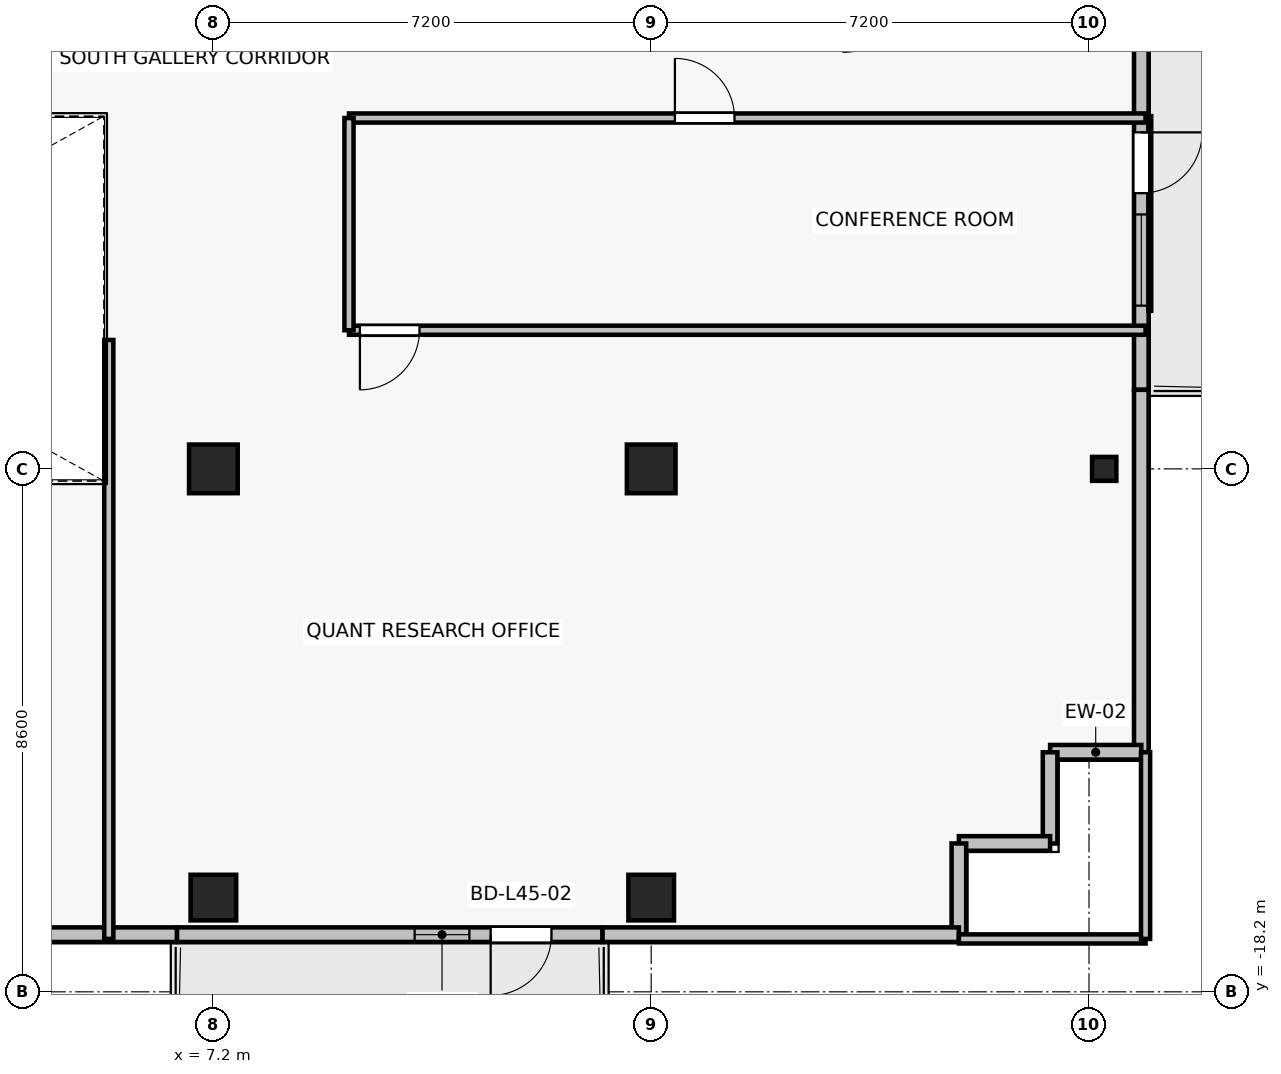
"""IFC4 building model, lengths in metres.
Left out: names, types, materials, properties, quantities, classifications, styles, units other than length and angle.
Written with IfcOpenShell. Run it as: python <this file> out.ifc"""

import sys

from ifc_helpers import new_model, si_unit, direction, frame, frame_2d, origin, origin_2d, place, context, subcontext, project, spatial, rectangle, i_section, extrude, source, transform, mapped, element, fill, save


model = new_model("IFC4")
c1 = context("Model", 3, precision=1e-05, world=origin(), true_north=direction((0.0, 1.0)))
c2 = subcontext(c1, "Body", "Model", "MODEL_VIEW")
j1 = project(units=[si_unit("LENGTHUNIT", "METRE"), si_unit("PLANEANGLEUNIT", "RADIAN")], contexts=[c1])
p1 = place(None, origin())
s1 = spatial("IfcSite", under=j1, at=p1, CompositionType="ELEMENT")
p2 = place(p1, origin())
s2 = spatial("IfcBuilding", under=s1, at=p2, CompositionType="ELEMENT")
p3 = place(p2, frame((0.0, 0.0, 162.7)))
s3 = spatial("IfcBuildingStorey", under=s2, at=p3, CompositionType="ELEMENT", Elevation=162.7)
for number, where, z_axis, x_axis in (
    (1, (7.2, -9.6, 0.0), (0.0, 0.0, 1.0), (1.0, 0.0, 0.0)),
    (2, (14.4, -9.6, 0.0), (0.0, 0.0, 1.0), (1.0, 0.0, 0.0)),
):
    element("IfcColumn", number, at=place(p3, frame(where, z_axis=z_axis, x_axis=x_axis)), inside=s3, PredefinedType="COLUMN", context=c2, shape_type="SweptSolid", body=[
        extrude(rectangle(XDim=0.8, YDim=0.8, at=origin_2d()), origin(), (0.0, 0.0, 1.0), 3.3),
    ])
for number, where, z_axis, x_axis in (
    (3, (7.2, -16.65, 0.0), (0.0, 0.0, 1.0), (1.0, 0.0, 0.0)),
    (4, (14.4, -16.65, 0.0), (0.0, 0.0, 1.0), (1.0, 0.0, 0.0)),
):
    element("IfcColumn", number, at=place(p3, frame(where, z_axis=z_axis, x_axis=x_axis)), inside=s3, PredefinedType="COLUMN", context=c2, shape_type="SweptSolid", body=[
        extrude(rectangle(XDim=0.75, YDim=0.75, at=origin_2d()), origin(), (0.0, 0.0, 1.0), 3.3),
    ])
p4 = place(p3, frame((21.85, -9.6, 0.0), z_axis=(0.0, 0.0, 1.0), x_axis=(1.0, 0.0, 0.0)))
e5 = element("IfcColumn", 5, at=p4, inside=s3, PredefinedType="COLUMN", context=c2, shape_type="SweptSolid", body=[
    extrude(i_section(OverallWidth=0.399, OverallDepth=0.394, WebThickness=0.023, FlangeThickness=0.037, FilletRadius=0.015, at=origin_2d()), origin(), (0.0, 0.0, 1.0), 3.3),
])
p5 = place(p3, frame((13.6, -17.26, 0.0), z_axis=(0.0, 0.0, 1.0), x_axis=(-1.0, 0.0, 0.0)))
e6 = element("IfcWall", 6, at=p5, inside=s3, PredefinedType="SOLIDWALL", context=c2, shape_type="SweptSolid", body=[
    extrude(rectangle(XDim=7.0, YDim=0.24, at=frame_2d((3.5, 0.0))), origin(), (0.0, 0.0, 1.0), 2.665),
])
p6 = place(p5, frame((0.84, 0.0, 0.0)))
e7 = element("IfcOpeningElement", 7, at=p6, cuts=e6, PredefinedType="OPENING", context=c2, shape_type="SweptSolid", body=[
    extrude(rectangle(XDim=1.0, YDim=2.2, at=frame_2d((0.5, 1.1))), frame((0.0, 0.13, 0.0), z_axis=(0.0, -1.0, 0.0), x_axis=(1.0, 0.0, 0.0)), (0.0, 0.0, 1.0), 0.26),
])
p7 = place(p5, frame((2.19, 0.0, 0.85)))
e8 = element("IfcOpeningElement", 8, at=p7, cuts=e6, PredefinedType="OPENING", context=c2, shape_type="SweptSolid", body=[
    extrude(rectangle(XDim=0.9, YDim=1.35, at=frame_2d((0.45, 0.675))), frame((0.0, 0.13, 0.0), z_axis=(0.0, -1.0, 0.0), x_axis=(1.0, 0.0, 0.0)), (0.0, 0.0, 1.0), 0.26),
])
p8 = place(p3, frame((22.46, -2.5, 0.0), z_axis=(0.0, 0.0, 1.0), x_axis=(0.0, -1.0, 0.0)))
e9 = element("IfcWall", 9, at=p8, inside=s3, PredefinedType="SOLIDWALL", context=c2, shape_type="SweptSolid", body=[
    extrude(rectangle(XDim=5.8, YDim=0.24, at=frame_2d((2.9, 0.0))), origin(), (0.0, 0.0, 1.0), 3.075),
])
p9 = place(p8, frame((1.566, 0.0, 0.0)))
e10 = element("IfcOpeningElement", 10, at=p9, cuts=e9, PredefinedType="OPENING", context=c2, shape_type="SweptSolid", body=[
    extrude(rectangle(XDim=1.0, YDim=2.2, at=frame_2d((0.5, 1.1))), frame((0.0, 0.13, 0.0), z_axis=(0.0, -1.0, 0.0), x_axis=(1.0, 0.0, 0.0)), (0.0, 0.0, 1.0), 0.26),
])
p10 = place(p8, frame((2.916, 0.0, 0.85)))
e11 = element("IfcOpeningElement", 11, at=p10, cuts=e9, PredefinedType="OPENING", context=c2, shape_type="SweptSolid", body=[
    extrude(rectangle(XDim=1.5, YDim=1.6, at=frame_2d((0.75, 0.8))), frame((0.0, 0.13, 0.0), z_axis=(0.0, -1.0, 0.0), x_axis=(1.0, 0.0, 0.0)), (0.0, 0.0, 1.0), 0.26),
])
p11 = place(p3, frame((22.46, -14.26, 0.0), z_axis=(0.0, 0.0, 1.0), x_axis=(0.0, 1.0, 0.0)))
e12 = element("IfcWall", 12, at=p11, inside=s3, PredefinedType="SOLIDWALL", context=c2, shape_type="SweptSolid", body=[
    extrude(rectangle(XDim=5.96, YDim=0.24, at=frame_2d((2.98, 0.0))), origin(), (0.0, 0.0, 1.0), 3.075),
])
for number, where, z_axis, x_axis in (
    (13, (20.96, -14.26, 0.0), (0.0, 0.0, 1.0), (1.0, 0.0, 0.0)),
    (14, (20.96, -15.76, 0.0), (0.0, 0.0, 1.0), (0.0, 1.0, 0.0)),
    (15, (19.46, -15.76, 0.0), (0.0, 0.0, 1.0), (1.0, 0.0, 0.0)),
    (16, (19.46, -17.26, 0.0), (0.0, 0.0, 1.0), (0.0, 1.0, 0.0)),
):
    element("IfcWall", number, at=place(p3, frame(where, z_axis=z_axis, x_axis=x_axis)), inside=s3, PredefinedType="SOLIDWALL", context=c2, shape_type="SweptSolid", body=[
        extrude(rectangle(XDim=1.5, YDim=0.24, at=frame_2d((0.75, 0.0))), origin(), (0.0, 0.0, 1.0), 3.075),
    ])
p12 = place(p3, frame((13.6, -17.26, 0.0), z_axis=(0.0, 0.0, 1.0), x_axis=(1.0, 0.0, 0.0)))
e17 = element("IfcWall", 17, at=p12, inside=s3, PredefinedType="SOLIDWALL", context=c2, shape_type="SweptSolid", body=[
    extrude(rectangle(XDim=5.86, YDim=0.24, at=frame_2d((2.93, 0.0))), origin(), (0.0, 0.0, 1.0), 2.665),
])
p13 = place(p3, frame((3.2, -17.26, 0.0), z_axis=(0.0, 0.0, 1.0), x_axis=(1.0, 0.0, 0.0)))
e18 = element("IfcWall", 18, at=p13, inside=s3, PredefinedType="SOLIDWALL", context=c2, shape_type="SweptSolid", body=[
    extrude(rectangle(XDim=3.4, YDim=0.24, at=frame_2d((1.7, 0.0))), origin(), (0.0, 0.0, 1.0), 3.075),
])
p14 = place(p3, frame((22.53, -7.32, 0.0), z_axis=(0.0, 0.0, 1.0), x_axis=(-1.0, 0.0, 0.0)))
e19 = element("IfcWall", 19, at=p14, inside=s3, PredefinedType="PARTITIONING", context=c2, shape_type="SweptSolid", body=[
    extrude(rectangle(XDim=13.1, YDim=0.15, at=frame_2d((6.55, 0.0))), origin(), (0.0, 0.0, 1.0), 2.565),
])
p15 = place(p14, frame((11.94, 0.0, 0.0)))
e20 = element("IfcOpeningElement", 20, at=p15, cuts=e19, PredefinedType="OPENING", context=c2, shape_type="SweptSolid", body=[
    extrude(rectangle(XDim=0.98, YDim=2.15, at=frame_2d((0.49, 1.075))), frame((0.0, 0.085, 0.0), z_axis=(0.0, -1.0, 0.0), x_axis=(1.0, 0.0, 0.0)), (0.0, 0.0, 1.0), 0.17),
])
p16 = place(p3, frame((9.43, -3.83, 0.0), z_axis=(0.0, 0.0, 1.0), x_axis=(1.0, 0.0, 0.0)))
e21 = element("IfcWall", 21, at=p16, inside=s3, PredefinedType="PARTITIONING", context=c2, shape_type="SweptSolid", body=[
    extrude(rectangle(XDim=13.1, YDim=0.15, at=frame_2d((6.55, 0.0))), origin(), (0.0, 0.0, 1.0), 2.565),
])
p17 = place(p16, frame((5.36, 0.0, 0.0)))
e22 = element("IfcOpeningElement", 22, at=p17, cuts=e21, PredefinedType="OPENING", context=c2, shape_type="SweptSolid", body=[
    extrude(rectangle(XDim=0.98, YDim=2.15, at=frame_2d((0.49, 1.075))), frame((0.0, 0.085, 0.0), z_axis=(0.0, -1.0, 0.0), x_axis=(1.0, 0.0, 0.0)), (0.0, 0.0, 1.0), 0.17),
])
p18 = place(p3, frame((9.43, -7.32, 0.0), z_axis=(0.0, 0.0, 1.0), x_axis=(0.0, 1.0, 0.0)))
e23 = element("IfcWall", 23, at=p18, inside=s3, PredefinedType="PARTITIONING", context=c2, shape_type="SweptSolid", body=[
    extrude(rectangle(XDim=3.49, YDim=0.15, at=frame_2d((1.745, 0.0))), origin(), (0.0, 0.0, 1.0), 2.665),
])
p19 = place(p3, frame((22.53, -17.33, 0.0), z_axis=(0.0, 0.0, 1.0), x_axis=(-1.0, 0.0, 0.0)))
e24 = element("IfcWall", 24, at=p19, inside=s3, PredefinedType="PARTITIONING", context=c2, shape_type="SweptSolid", body=[
    extrude(rectangle(XDim=3.07, YDim=0.15, at=frame_2d((1.535, 0.0))), origin(), (0.0, 0.0, 1.0), 2.665),
])
p20 = place(p3, frame((5.48, -17.33, 0.0), z_axis=(0.0, 0.0, 1.0), x_axis=(0.0, 1.0, 0.0)))
e25 = element("IfcWall", 25, at=p20, inside=s3, PredefinedType="PARTITIONING", context=c2, shape_type="SweptSolid", body=[
    extrude(rectangle(XDim=9.85, YDim=0.15, at=frame_2d((4.925, 0.0))), origin(), (0.0, 0.0, 1.0), 2.565),
])
p21 = place(p3, frame((22.53, -14.26, 0.0), z_axis=(0.0, 0.0, 1.0), x_axis=(0.0, -1.0, 0.0)))
e26 = element("IfcWall", 26, at=p21, inside=s3, PredefinedType="PARTITIONING", context=c2, shape_type="SweptSolid", body=[
    extrude(rectangle(XDim=3.07, YDim=0.15, at=frame_2d((1.535, 0.0))), origin(), (0.0, 0.0, 1.0), 3.075),
])
m1 = source(origin(), c2, "Body", "SweptSolid", [
    extrude(rectangle(XDim=1.0, YDim=2.2, at=frame_2d((0.5, 1.1))), frame((0.0, 0.025, 0.0), z_axis=(0.0, -1.0, 0.0), x_axis=(1.0, 0.0, 0.0)), (0.0, 0.0, 1.0), 0.05),
])
p22 = place(p6, origin())
e27 = element("IfcDoor", 27, at=p22, inside=s3, OperationType="SINGLE_SWING_RIGHT", PredefinedType="DOOR", context=c2, shape_type="MappedRepresentation", body=[
    mapped(m1, transform((0.0, 0.0, 0.0), x_axis=(1.0, 0.0, 0.0), y_axis=(0.0, 1.0, 0.0), z_axis=(0.0, 0.0, 1.0), scale=1.0)),
])
fill(e7, e27)
m2 = source(origin(), c2, "Body", "SweptSolid", [
    extrude(rectangle(XDim=0.9, YDim=1.35, at=frame_2d((0.45, 0.675))), frame((0.0, 0.03, 0.0), z_axis=(0.0, -1.0, 0.0), x_axis=(1.0, 0.0, 0.0)), (0.0, 0.0, 1.0), 0.06),
])
p23 = place(p7, origin())
e28 = element("IfcWindow", 28, at=p23, inside=s3, PartitioningType="SINGLE_PANEL", PredefinedType="WINDOW", context=c2, shape_type="MappedRepresentation", body=[
    mapped(m2, transform((0.0, 0.0, 0.0), x_axis=(1.0, 0.0, 0.0), y_axis=(0.0, 1.0, 0.0), z_axis=(0.0, 0.0, 1.0), scale=1.0)),
])
fill(e8, e28)
p24 = place(p9, origin())
e29 = element("IfcDoor", 29, at=p24, inside=s3, OperationType="SINGLE_SWING_LEFT", PredefinedType="DOOR", context=c2, shape_type="MappedRepresentation", body=[
    mapped(m1, transform((0.0, 0.0, 0.0), x_axis=(1.0, 0.0, 0.0), y_axis=(0.0, 1.0, 0.0), z_axis=(0.0, 0.0, 1.0), scale=1.0)),
])
fill(e10, e29)
m3 = source(origin(), c2, "Body", "SweptSolid", [
    extrude(rectangle(XDim=1.5, YDim=1.6, at=frame_2d((0.75, 0.8))), frame((0.0, 0.03, 0.0), z_axis=(0.0, -1.0, 0.0), x_axis=(1.0, 0.0, 0.0)), (0.0, 0.0, 1.0), 0.06),
])
p25 = place(p10, origin())
e30 = element("IfcWindow", 30, at=p25, inside=s3, PartitioningType="SINGLE_PANEL", PredefinedType="WINDOW", context=c2, shape_type="MappedRepresentation", body=[
    mapped(m3, transform((0.0, 0.0, 0.0), x_axis=(1.0, 0.0, 0.0), y_axis=(0.0, 1.0, 0.0), z_axis=(0.0, 0.0, 1.0), scale=1.0)),
])
fill(e11, e30)
m4 = source(origin(), c2, "Body", "SweptSolid", [
    extrude(rectangle(XDim=0.98, YDim=2.15, at=frame_2d((0.49, 1.075))), frame((0.0, 0.025, 0.0), z_axis=(0.0, -1.0, 0.0), x_axis=(1.0, 0.0, 0.0)), (0.0, 0.0, 1.0), 0.05),
])
p26 = place(p17, origin())
e31 = element("IfcDoor", 31, at=p26, inside=s3, OperationType="SINGLE_SWING_LEFT", PredefinedType="DOOR", context=c2, shape_type="MappedRepresentation", body=[
    mapped(m4, transform((0.0, 0.0, 0.0), x_axis=(1.0, 0.0, 0.0), y_axis=(0.0, 1.0, 0.0), z_axis=(0.0, 0.0, 1.0), scale=1.0)),
])
fill(e22, e31)
p27 = place(p15, origin())
e32 = element("IfcDoor", 32, at=p27, inside=s3, OperationType="SINGLE_SWING_RIGHT", PredefinedType="DOOR", context=c2, shape_type="MappedRepresentation", body=[
    mapped(m4, transform((0.0, 0.0, 0.0), x_axis=(1.0, 0.0, 0.0), y_axis=(0.0, 1.0, 0.0), z_axis=(0.0, 0.0, 1.0), scale=1.0)),
])
fill(e20, e32)
save(model, sys.argv[1])
